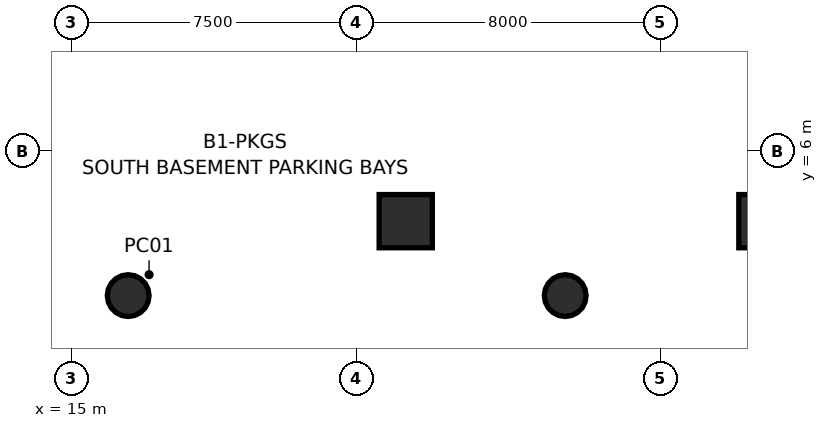
"""IFC4 building model, lengths in metres.
Left out: names, types, materials, properties, quantities, classifications, styles, units other than length and angle.
Written with IfcOpenShell. Run it as: python <this file> out.ifc"""

import sys

from ifc_helpers import new_model, si_unit, direction, frame, origin, origin_2d, place, context, subcontext, project, spatial, hollow_rectangle, hollow_circle, extrude, source, transform, mapped, element, save


model = new_model("IFC4")
c1 = context("Model", 3, precision=1e-05, world=origin(), true_north=direction((0.0, 1.0)))
c2 = subcontext(c1, "Body", "Model", "MODEL_VIEW")
j1 = project(units=[si_unit("LENGTHUNIT", "METRE"), si_unit("PLANEANGLEUNIT", "RADIAN")], contexts=[c1])
p1 = place(None, origin())
s1 = spatial("IfcSite", under=j1, at=p1, CompositionType="ELEMENT")
p2 = place(p1, origin())
s2 = spatial("IfcBuilding", under=s1, at=p2, CompositionType="ELEMENT")
p3 = place(p2, frame((0.0, 0.0, -4.8)))
s3 = spatial("IfcBuildingStorey", under=s2, at=p3, CompositionType="ELEMENT", Elevation=-4.8)
m1 = source(origin(), c2, "Body", "SweptSolid", [
    extrude(hollow_rectangle(XDim=1.4, YDim=1.4, WallThickness=0.08, at=origin_2d()), origin(), (0.0, 0.0, 1.0), 4.802),
])
p4 = place(p3, frame((23.804, 4.158, 0.0), z_axis=(-0.013423747222, 0.019830535668, 0.999713235316), x_axis=(-0.828109472136, -0.560566411907, 0.0)))
e1 = element("IfcColumn", 1, at=p4, inside=s3, PredefinedType="COLUMN", context=c2, shape_type="MappedRepresentation", body=[
    mapped(m1, transform((0.0, 0.0, 0.0), scale=1.0)),
])
m2 = source(origin(), c2, "Body", "SweptSolid", [
    extrude(hollow_rectangle(XDim=1.4, YDim=1.4, WallThickness=0.08, at=origin_2d()), origin(), (0.0, 0.0, 1.0), 4.801),
])
p5 = place(p3, frame((33.268, 4.158, 0.0), z_axis=(-0.004474940809, 0.019832124038, 0.99979330952), x_axis=(-0.975475660355, -0.22010732849, 0.0)))
e2 = element("IfcColumn", 2, at=p5, inside=s3, PredefinedType="COLUMN", context=c2, shape_type="MappedRepresentation", body=[
    mapped(m2, transform((0.0, 0.0, 0.0), scale=1.0)),
])
m3 = source(origin(), c2, "Body", "SweptSolid", [
    extrude(hollow_circle(Radius=0.55, WallThickness=0.045, at=origin_2d()), origin(), (0.0, 0.0, 1.0), 4.8),
])
for number, where, z_axis, x_axis in (
    (3, (16.5, 2.2, 0.0), (0.0, 0.0, 1.0), (1.0, 0.0, 0.0)),
    (4, (28.0, 2.2, 0.0), (0.0, 0.0, 1.0), (1.0, 0.0, 0.0)),
):
    element("IfcColumn", number, at=place(p3, frame(where, z_axis=z_axis, x_axis=x_axis)), inside=s3, PredefinedType="COLUMN", context=c2, shape_type="MappedRepresentation", body=[
        mapped(m3, transform((0.0, 0.0, 0.0), scale=1.0)),
    ])
save(model, sys.argv[1])
